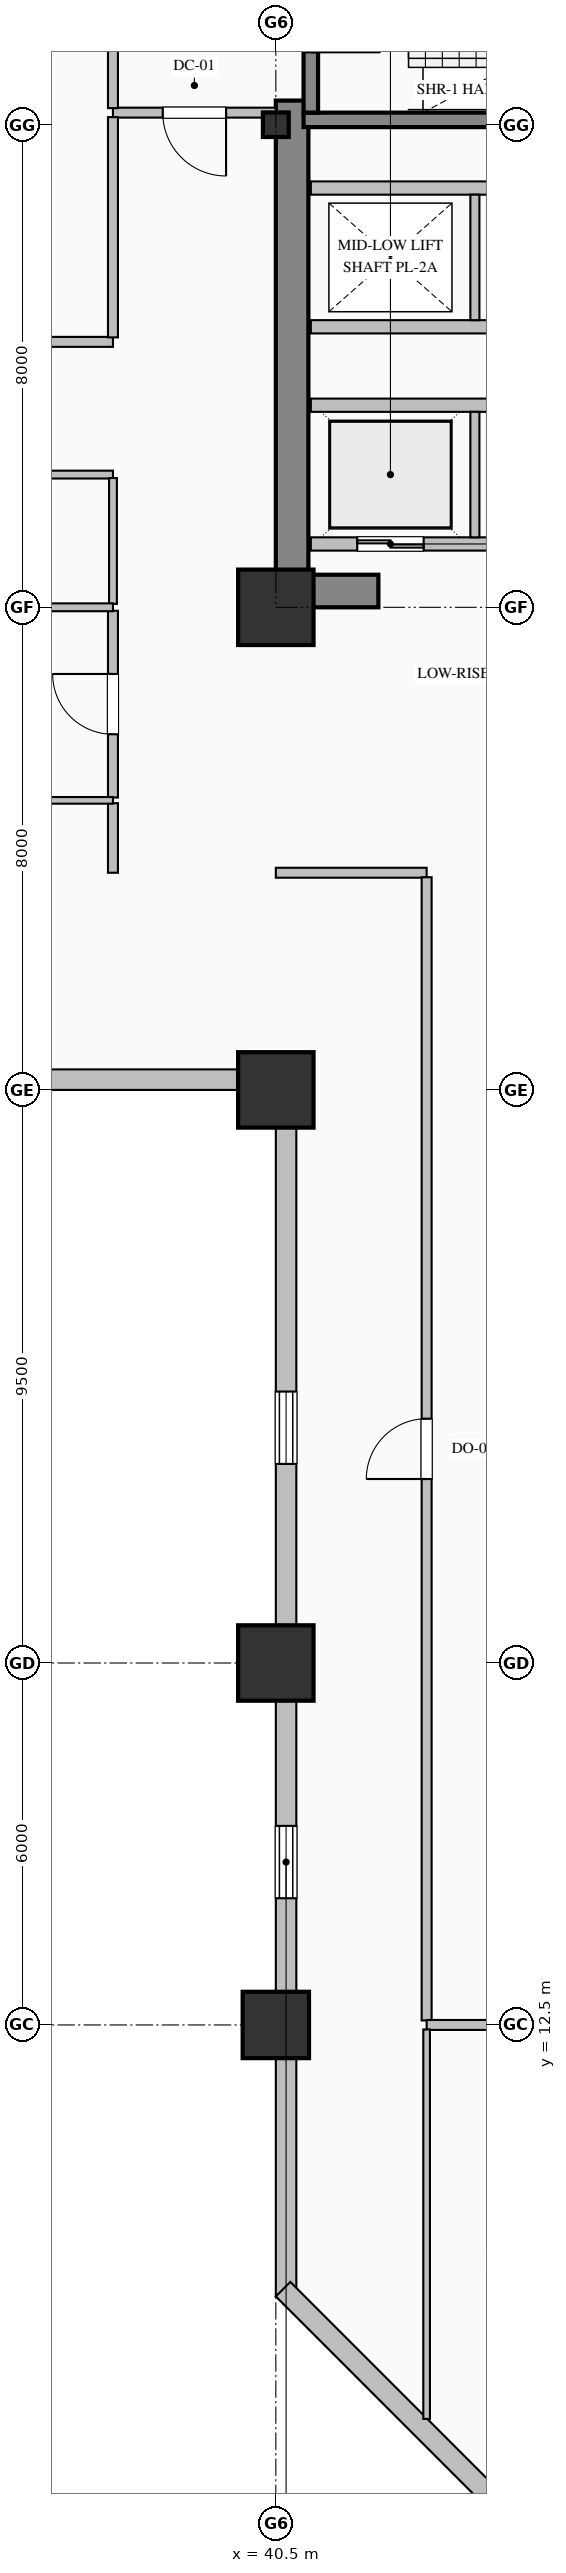
"""IFC4 building model, lengths in metres.
Left out: names, types, materials, properties, quantities, classifications, styles, units other than length and angle.
Written with IfcOpenShell. Run it as: python <this file> out.ifc"""

import sys

from ifc_helpers import new_model, si_unit, direction, frame, frame_2d, origin, origin_2d, place, context, subcontext, project, spatial, rectangle, hollow_rectangle, i_section, extrude, element, fill, save


model = new_model("IFC4")
c1 = context("Model", 3, precision=1e-05, world=origin(), true_north=direction((0.0, 1.0)))
c2 = subcontext(c1, "Body", "Model", "MODEL_VIEW")
j1 = project(units=[si_unit("LENGTHUNIT", "METRE"), si_unit("PLANEANGLEUNIT", "RADIAN")], contexts=[c1])
p1 = place(None, origin())
s1 = spatial("IfcSite", under=j1, at=p1, CompositionType="ELEMENT")
p2 = place(p1, origin())
s2 = spatial("IfcBuilding", under=s1, at=p2, CompositionType="ELEMENT")
p3 = place(p2, frame((0.0, 0.0, 48.2)))
s3 = spatial("IfcBuildingStorey", under=s2, at=p3, CompositionType="ELEMENT", Elevation=48.2)
p4 = place(p3, frame((40.77, 36.54, 0.0), z_axis=(0.0, 0.0, 1.0), x_axis=(0.0, 1.0, 0.0)))
e1 = element("IfcWall", 1, at=p4, inside=s3, PredefinedType="SHEAR", context=c2, shape_type="SweptSolid", body=[
    extrude(rectangle(XDim=7.86, YDim=0.54, at=frame_2d((3.93, 0.0))), origin(), (0.0, 0.0, 1.0), 3.75),
])
p5 = place(p3, frame((40.5, 36.27, 0.0), z_axis=(0.0, 0.0, 1.0), x_axis=(1.0, 0.0, 0.0)))
e2 = element("IfcWall", 2, at=p5, inside=s3, PredefinedType="SHEAR", context=c2, shape_type="SweptSolid", body=[
    extrude(rectangle(XDim=1.7, YDim=0.54, at=frame_2d((0.85, 0.0))), origin(), (0.0, 0.0, 1.0), 3.75),
])
p6 = place(p3, frame((40.5, 12.5, 0.0), z_axis=(0.0, 0.0, 1.0), x_axis=(1.0, 0.0, 0.0)))
e3 = element("IfcColumn", 3, at=p6, inside=s3, PredefinedType="COLUMN", context=c2, shape_type="SweptSolid", body=[
    extrude(hollow_rectangle(XDim=1.1, YDim=1.1, WallThickness=0.04, at=origin_2d()), origin(), (0.0, 0.0, 1.0), 4.0),
])
for number, where, z_axis, x_axis in (
    (4, (40.5, 18.5, 0.0), (0.0, 0.0, 1.0), (1.0, 0.0, 0.0)),
    (5, (40.5, 28.0, 0.0), (0.0, 0.0, 1.0), (1.0, 0.0, 0.0)),
    (6, (40.5, 36.0, 0.0), (0.0, 0.0, 1.0), (1.0, 0.0, 0.0)),
):
    element("IfcColumn", number, at=place(p3, frame(where, z_axis=z_axis, x_axis=x_axis)), inside=s3, PredefinedType="COLUMN", context=c2, shape_type="SweptSolid", body=[
        extrude(hollow_rectangle(XDim=1.25, YDim=1.25, WallThickness=0.045, at=origin_2d()), origin(), (0.0, 0.0, 1.0), 4.0),
    ])
p7 = place(p3, frame((40.5, 44.0, 0.0), z_axis=(0.0, 0.0, 1.0), x_axis=(1.0, 0.0, 0.0)))
e7 = element("IfcColumn", 7, at=p7, inside=s3, PredefinedType="COLUMN", context=c2, shape_type="SweptSolid", body=[
    extrude(i_section(OverallWidth=0.407, OverallDepth=0.428, WebThickness=0.02, FlangeThickness=0.035, FilletRadius=0.022, at=origin_2d()), origin(), (0.0, 0.0, 1.0), 4.0),
])
p8 = place(p3, frame((40.67, 8.0, 0.0), z_axis=(0.0, 0.0, 1.0), x_axis=(0.0, 1.0, 0.0)))
e8 = element("IfcWall", 8, at=p8, inside=s3, PredefinedType="SOLIDWALL", context=c2, shape_type="SweptSolid", body=[
    extrude(rectangle(XDim=20.34, YDim=0.34, at=frame_2d((10.17, 0.0))), origin(), (0.0, 0.0, 1.0), 3.05),
])
p9 = place(p8, frame((6.6, 0.0, 0.7)))
e9 = element("IfcOpeningElement", 9, at=p9, cuts=e8, PredefinedType="OPENING", context=c2, shape_type="SweptSolid", body=[
    extrude(rectangle(XDim=1.2, YDim=1.85, at=frame_2d((0.6, 0.925))), frame((0.0, 0.18, 0.0), z_axis=(0.0, -1.0, 0.0), x_axis=(1.0, 0.0, 0.0)), (0.0, 0.0, 1.0), 0.36),
])
p10 = place(p8, frame((13.8, 0.0, 0.7)))
e10 = element("IfcOpeningElement", 10, at=p10, cuts=e8, PredefinedType="OPENING", context=c2, shape_type="SweptSolid", body=[
    extrude(rectangle(XDim=1.2, YDim=1.85, at=frame_2d((0.6, 0.925))), frame((0.0, 0.18, 0.0), z_axis=(0.0, -1.0, 0.0), x_axis=(1.0, 0.0, 0.0)), (0.0, 0.0, 1.0), 0.36),
])
p11 = place(p3, frame((40.52, 28.17, 0.0), z_axis=(0.0, 0.0, 1.0), x_axis=(-1.0, 0.0, 0.0)))
e11 = element("IfcWall", 11, at=p11, inside=s3, PredefinedType="SOLIDWALL", context=c2, shape_type="SweptSolid", body=[
    extrude(rectangle(XDim=36.52, YDim=0.34, at=frame_2d((18.26, 0.0))), origin(), (0.0, 0.0, 1.0), 3.05),
])
p12 = place(p11, frame((10.2, 0.0, 0.7)))
e12 = element("IfcOpeningElement", 12, at=p12, cuts=e11, PredefinedType="OPENING", context=c2, shape_type="SweptSolid", body=[
    extrude(rectangle(XDim=1.2, YDim=1.85, at=frame_2d((0.6, 0.925))), frame((0.0, 0.18, 0.0), z_axis=(0.0, -1.0, 0.0), x_axis=(1.0, 0.0, 0.0)), (0.0, 0.0, 1.0), 0.36),
])
p13 = place(p11, frame((13.8, 0.0, 0.7)))
e13 = element("IfcOpeningElement", 13, at=p13, cuts=e11, PredefinedType="OPENING", context=c2, shape_type="SweptSolid", body=[
    extrude(rectangle(XDim=1.2, YDim=1.85, at=frame_2d((0.6, 0.925))), frame((0.0, 0.18, 0.0), z_axis=(0.0, -1.0, 0.0), x_axis=(1.0, 0.0, 0.0)), (0.0, 0.0, 1.0), 0.36),
])
p14 = place(p11, frame((17.4, 0.0, 0.7)))
e14 = element("IfcOpeningElement", 14, at=p14, cuts=e11, PredefinedType="OPENING", context=c2, shape_type="SweptSolid", body=[
    extrude(rectangle(XDim=1.2, YDim=1.85, at=frame_2d((0.6, 0.925))), frame((0.0, 0.18, 0.0), z_axis=(0.0, -1.0, 0.0), x_axis=(1.0, 0.0, 0.0)), (0.0, 0.0, 1.0), 0.36),
])
p15 = place(p11, frame((21.0, 0.0, 0.7)))
e15 = element("IfcOpeningElement", 15, at=p15, cuts=e11, PredefinedType="OPENING", context=c2, shape_type="SweptSolid", body=[
    extrude(rectangle(XDim=1.2, YDim=1.85, at=frame_2d((0.6, 0.925))), frame((0.0, 0.18, 0.0), z_axis=(0.0, -1.0, 0.0), x_axis=(1.0, 0.0, 0.0)), (0.0, 0.0, 1.0), 0.36),
])
p16 = place(p11, frame((28.2, 0.0, 0.7)))
e16 = element("IfcOpeningElement", 16, at=p16, cuts=e11, PredefinedType="OPENING", context=c2, shape_type="SweptSolid", body=[
    extrude(rectangle(XDim=1.2, YDim=1.85, at=frame_2d((0.6, 0.925))), frame((0.0, 0.18, 0.0), z_axis=(0.0, -1.0, 0.0), x_axis=(1.0, 0.0, 0.0)), (0.0, 0.0, 1.0), 0.36),
])
p17 = place(p3, frame((44.62, 4.12, 0.0), z_axis=(0.0, 0.0, 1.0), x_axis=(-0.707106781187, 0.707106781187, 0.0)))
e17 = element("IfcWall", 17, at=p17, inside=s3, PredefinedType="SOLIDWALL", context=c2, shape_type="SweptSolid", body=[
    extrude(rectangle(XDim=5.657, YDim=0.34, at=frame_2d((2.828, 0.0))), origin(), (0.0, 0.0, 1.0), 3.75),
])
p18 = place(p3, frame((49.04, 44.08, 0.0), z_axis=(0.0, 0.0, 1.0), x_axis=(-1.0, 0.0, 0.0)))
e18 = element("IfcWall", 18, at=p18, inside=s3, PredefinedType="SOLIDWALL", context=c2, shape_type="SweptSolid", body=[
    extrude(rectangle(XDim=8.08, YDim=0.24, at=frame_2d((4.04, 0.0))), origin(), (0.0, 0.0, 1.0), 4.0),
])
p19 = place(p3, frame((41.08, 47.35, 0.0), z_axis=(0.0, 0.0, 1.0), x_axis=(0.0, -1.0, 0.0)))
e19 = element("IfcWall", 19, at=p19, inside=s3, PredefinedType="SOLIDWALL", context=c2, shape_type="SweptSolid", body=[
    extrude(rectangle(XDim=3.15, YDim=0.24, at=frame_2d((1.575, 0.0))), origin(), (0.0, 0.0, 1.0), 4.0),
])
p20 = place(p19, frame((1.0, 0.0, 0.0)))
e20 = element("IfcOpeningElement", 20, at=p20, cuts=e19, PredefinedType="OPENING", context=c2, shape_type="SweptSolid", body=[
    extrude(rectangle(XDim=1.15, YDim=2.2, at=frame_2d((0.575, 1.1))), frame((0.0, 0.13, 0.0), z_axis=(0.0, -1.0, 0.0), x_axis=(1.0, 0.0, 0.0)), (0.0, 0.0, 1.0), 0.26),
])
p21 = place(p3, frame((49.32, 37.05, 0.0), z_axis=(0.0, 0.0, 1.0), x_axis=(-1.0, 0.0, 0.0)))
e21 = element("IfcWall", 21, at=p21, inside=s3, PredefinedType="PARTITIONING", context=c2, shape_type="SweptSolid", body=[
    extrude(rectangle(XDim=8.24, YDim=0.22, at=frame_2d((4.12, 0.0))), origin(), (0.0, 0.0, 1.0), 3.75),
])
p22 = place(p21, frame((6.37, 0.0, 0.0)))
e22 = element("IfcOpeningElement", 22, at=p22, cuts=e21, PredefinedType="OPENING", context=c2, shape_type="SweptSolid", body=[
    extrude(rectangle(XDim=1.1, YDim=2.2, at=frame_2d((0.55, 1.1))), frame((0.0, 0.12, 0.0), z_axis=(0.0, -1.0, 0.0), x_axis=(1.0, 0.0, 0.0)), (0.0, 0.0, 1.0), 0.24),
])
p23 = place(p21, frame((3.57, 0.0, 0.0)))
e23 = element("IfcOpeningElement", 23, at=p23, cuts=e21, PredefinedType="OPENING", context=c2, shape_type="SweptSolid", body=[
    extrude(rectangle(XDim=1.1, YDim=2.2, at=frame_2d((0.55, 1.1))), frame((0.0, 0.12, 0.0), z_axis=(0.0, -1.0, 0.0), x_axis=(1.0, 0.0, 0.0)), (0.0, 0.0, 1.0), 0.24),
])
p24 = place(p21, frame((0.77, 0.0, 0.0)))
e24 = element("IfcOpeningElement", 24, at=p24, cuts=e21, PredefinedType="OPENING", context=c2, shape_type="SweptSolid", body=[
    extrude(rectangle(XDim=1.1, YDim=2.2, at=frame_2d((0.55, 1.1))), frame((0.0, 0.12, 0.0), z_axis=(0.0, -1.0, 0.0), x_axis=(1.0, 0.0, 0.0)), (0.0, 0.0, 1.0), 0.24),
])
p25 = place(p3, frame((41.08, 39.35, 0.0), z_axis=(0.0, 0.0, 1.0), x_axis=(1.0, 0.0, 0.0)))
e25 = element("IfcWall", 25, at=p25, inside=s3, PredefinedType="PARTITIONING", context=c2, shape_type="SweptSolid", body=[
    extrude(rectangle(XDim=8.24, YDim=0.22, at=frame_2d((4.12, 0.0))), origin(), (0.0, 0.0, 1.0), 3.75),
])
p26 = place(p3, frame((43.8, 37.16, 0.0), z_axis=(0.0, 0.0, 1.0), x_axis=(0.0, 1.0, 0.0)))
e26 = element("IfcWall", 26, at=p26, inside=s3, PredefinedType="PARTITIONING", context=c2, shape_type="SweptSolid", body=[
    extrude(rectangle(XDim=2.08, YDim=0.15, at=frame_2d((1.04, 0.0))), origin(), (0.0, 0.0, 1.0), 3.75),
])
for number, where, z_axis, x_axis in (
    (27, (49.32, 40.65, 0.0), (0.0, 0.0, 1.0), (-1.0, 0.0, 0.0)),
    (28, (41.08, 42.95, 0.0), (0.0, 0.0, 1.0), (1.0, 0.0, 0.0)),
):
    element("IfcWall", number, at=place(p3, frame(where, z_axis=z_axis, x_axis=x_axis)), inside=s3, PredefinedType="PARTITIONING", context=c2, shape_type="SweptSolid", body=[
        extrude(rectangle(XDim=8.24, YDim=0.22, at=frame_2d((4.12, 0.0))), origin(), (0.0, 0.0, 1.0), 3.75),
    ])
p27 = place(p3, frame((43.8, 40.76, 0.0), z_axis=(0.0, 0.0, 1.0), x_axis=(0.0, 1.0, 0.0)))
e29 = element("IfcWall", 29, at=p27, inside=s3, PredefinedType="PARTITIONING", context=c2, shape_type="SweptSolid", body=[
    extrude(rectangle(XDim=2.08, YDim=0.15, at=frame_2d((1.04, 0.0))), origin(), (0.0, 0.0, 1.0), 3.75),
])
p28 = place(p3, frame((40.5, 44.2, 0.0), z_axis=(0.0, 0.0, 1.0), x_axis=(-1.0, 0.0, 0.0)))
e30 = element("IfcWall", 30, at=p28, inside=s3, PredefinedType="PARTITIONING", context=c2, shape_type="SweptSolid", body=[
    extrude(rectangle(XDim=2.7, YDim=0.165, at=frame_2d((1.35, 0.0))), origin(), (0.0, 0.0, 1.0), 3.75),
])
p29 = place(p28, frame((0.825, 0.0, 0.0)))
e31 = element("IfcOpeningElement", 31, at=p29, cuts=e30, PredefinedType="OPENING", context=c2, shape_type="SweptSolid", body=[
    extrude(rectangle(XDim=1.05, YDim=2.15, at=frame_2d((0.525, 1.075))), frame((0.0, 0.093, 0.0), z_axis=(0.0, -1.0, 0.0), x_axis=(1.0, 0.0, 0.0)), (0.0, 0.0, 1.0), 0.185),
])
p30 = place(p3, frame((37.8, 44.274, 0.0), z_axis=(0.0, 0.0, 1.0), x_axis=(0.0, 1.0, 0.0)))
e32 = element("IfcWall", 32, at=p30, inside=s3, PredefinedType="PARTITIONING", context=c2, shape_type="SweptSolid", body=[
    extrude(rectangle(XDim=3.051, YDim=0.165, at=frame_2d((1.525, 0.0))), origin(), (0.0, 0.0, 1.0), 3.75),
])
p31 = place(p3, frame((32.5, 40.4, 0.0), z_axis=(0.0, 0.0, 1.0), x_axis=(1.0, 0.0, 0.0)))
e33 = element("IfcWall", 33, at=p31, inside=s3, PredefinedType="PARTITIONING", context=c2, shape_type="SweptSolid", body=[
    extrude(rectangle(XDim=5.3, YDim=0.165, at=frame_2d((2.65, 0.0))), origin(), (0.0, 0.0, 1.0), 3.75),
])
p32 = place(p31, frame((2.1, 0.0, 0.0)))
e34 = element("IfcOpeningElement", 34, at=p32, cuts=e33, PredefinedType="OPENING", context=c2, shape_type="SweptSolid", body=[
    extrude(rectangle(XDim=1.1, YDim=2.2, at=frame_2d((0.55, 1.1))), frame((0.0, 0.093, 0.0), z_axis=(0.0, -1.0, 0.0), x_axis=(1.0, 0.0, 0.0)), (0.0, 0.0, 1.0), 0.185),
])
p33 = place(p3, frame((37.8, 38.2, 0.0), z_axis=(0.0, 0.0, 1.0), x_axis=(-1.0, 0.0, 0.0)))
e35 = element("IfcWall", 35, at=p33, inside=s3, PredefinedType="PARTITIONING", context=c2, shape_type="SweptSolid", body=[
    extrude(rectangle(XDim=28.8, YDim=0.13, at=frame_2d((14.4, 0.0))), origin(), (0.0, 0.0, 1.0), 3.75),
])
p34 = place(p33, frame((13.9, 0.0, 0.0)))
e36 = element("IfcOpeningElement", 36, at=p34, cuts=e35, PredefinedType="OPENING", context=c2, shape_type="SweptSolid", body=[
    extrude(rectangle(XDim=1.0, YDim=2.15, at=frame_2d((0.5, 1.075))), frame((0.0, 0.075, 0.0), z_axis=(0.0, -1.0, 0.0), x_axis=(1.0, 0.0, 0.0)), (0.0, 0.0, 1.0), 0.15),
])
p35 = place(p3, frame((37.8, 40.475, 0.0), z_axis=(0.0, 0.0, 1.0), x_axis=(0.0, 1.0, 0.0)))
e37 = element("IfcWall", 37, at=p35, inside=s3, PredefinedType="PARTITIONING", context=c2, shape_type="SweptSolid", body=[
    extrude(rectangle(XDim=3.651, YDim=0.165, at=frame_2d((1.825, 0.0))), origin(), (0.0, 0.0, 1.0), 3.75),
])
p36 = place(p3, frame((37.8, 31.6, 0.0), z_axis=(0.0, 0.0, 1.0), x_axis=(0.0, 1.0, 0.0)))
e38 = element("IfcWall", 38, at=p36, inside=s3, PredefinedType="PARTITIONING", context=c2, shape_type="SweptSolid", body=[
    extrude(rectangle(XDim=1.153, YDim=0.165, at=frame_2d((0.576, 0.0))), origin(), (0.0, 0.0, 1.0), 3.75),
])
p37 = place(p3, frame((37.8, 32.847, 0.0), z_axis=(0.0, 0.0, 1.0), x_axis=(0.0, 1.0, 0.0)))
e39 = element("IfcWall", 39, at=p37, inside=s3, PredefinedType="PARTITIONING", context=c2, shape_type="SweptSolid", body=[
    extrude(rectangle(XDim=3.096, YDim=0.165, at=frame_2d((1.548, 0.0))), origin(), (0.0, 0.0, 1.0), 3.75),
])
p38 = place(p37, frame((1.048, 0.0, 0.0)))
e40 = element("IfcOpeningElement", 40, at=p38, cuts=e39, PredefinedType="OPENING", context=c2, shape_type="SweptSolid", body=[
    extrude(rectangle(XDim=1.0, YDim=2.15, at=frame_2d((0.5, 1.075))), frame((0.0, 0.093, 0.0), z_axis=(0.0, -1.0, 0.0), x_axis=(1.0, 0.0, 0.0)), (0.0, 0.0, 1.0), 0.185),
])
p39 = place(p3, frame((37.8, 36.057, 0.0), z_axis=(0.0, 0.0, 1.0), x_axis=(0.0, 1.0, 0.0)))
e41 = element("IfcWall", 41, at=p39, inside=s3, PredefinedType="PARTITIONING", context=c2, shape_type="SweptSolid", body=[
    extrude(rectangle(XDim=2.086, YDim=0.13, at=frame_2d((1.043, 0.0))), origin(), (0.0, 0.0, 1.0), 3.75),
])
p40 = place(p3, frame((43.0, 31.6, 0.0), z_axis=(0.0, 0.0, 1.0), x_axis=(-1.0, 0.0, 0.0)))
e42 = element("IfcWall", 42, at=p40, inside=s3, PredefinedType="PARTITIONING", context=c2, shape_type="SweptSolid", body=[
    extrude(rectangle(XDim=2.5, YDim=0.165, at=frame_2d((1.25, 0.0))), origin(), (0.0, 0.0, 1.0), 3.75),
])
p41 = place(p3, frame((43.0, 12.574, 0.0), z_axis=(0.0, 0.0, 1.0), x_axis=(0.0, 1.0, 0.0)))
e43 = element("IfcWall", 43, at=p41, inside=s3, PredefinedType="PARTITIONING", context=c2, shape_type="SweptSolid", body=[
    extrude(rectangle(XDim=18.951, YDim=0.165, at=frame_2d((9.476, 0.0))), origin(), (0.0, 0.0, 1.0), 3.75),
])
p42 = place(p41, frame((8.976, 0.0, 0.0)))
e44 = element("IfcOpeningElement", 44, at=p42, cuts=e43, PredefinedType="OPENING", context=c2, shape_type="SweptSolid", body=[
    extrude(rectangle(XDim=1.0, YDim=2.15, at=frame_2d((0.5, 1.075))), frame((0.0, 0.093, 0.0), z_axis=(0.0, -1.0, 0.0), x_axis=(1.0, 0.0, 0.0)), (0.0, 0.0, 1.0), 0.185),
])
p43 = place(p3, frame((45.2, 12.5, 0.0), z_axis=(0.0, 0.0, 1.0), x_axis=(-1.0, 0.0, 0.0)))
e45 = element("IfcWall", 45, at=p43, inside=s3, PredefinedType="PARTITIONING", context=c2, shape_type="SweptSolid", body=[
    extrude(rectangle(XDim=2.2, YDim=0.165, at=frame_2d((1.1, 0.0))), origin(), (0.0, 0.0, 1.0), 3.042),
])
p44 = place(p3, frame((43.0, 12.426, 0.0), z_axis=(0.0, 0.0, 1.0), x_axis=(0.0, -1.0, 0.0)))
e46 = element("IfcWall", 46, at=p44, inside=s3, PredefinedType="MOVABLE", context=c2, shape_type="SweptSolid", body=[
    extrude(rectangle(XDim=6.456, YDim=0.11, at=frame_2d((3.228, 0.0))), origin(), (0.0, 0.0, 1.0), 3.75),
])
p45 = place(p3, frame((0.332, 32.8, 0.0), z_axis=(0.0, 0.0, 1.0), x_axis=(1.0, 0.0, 0.0)))
e47 = element("IfcWall", 47, at=p45, inside=s3, PredefinedType="MOVABLE", context=c2, shape_type="SweptSolid", body=[
    extrude(rectangle(XDim=37.468, YDim=0.11, at=frame_2d((18.734, 0.0))), origin(), (0.0, 0.0, 1.0), 3.75),
])
p46 = place(p45, frame((18.234, 0.0, 0.0)))
e48 = element("IfcOpeningElement", 48, at=p46, cuts=e47, PredefinedType="OPENING", context=c2, shape_type="SweptSolid", body=[
    extrude(rectangle(XDim=1.0, YDim=2.15, at=frame_2d((0.5, 1.075))), frame((0.0, 0.065, 0.0), z_axis=(0.0, -1.0, 0.0), x_axis=(1.0, 0.0, 0.0)), (0.0, 0.0, 1.0), 0.13),
])
p47 = place(p3, frame((0.332, 36.0, 0.0), z_axis=(0.0, 0.0, 1.0), x_axis=(1.0, 0.0, 0.0)))
e49 = element("IfcWall", 49, at=p47, inside=s3, PredefinedType="PARTITIONING", context=c2, shape_type="SweptSolid", body=[
    extrude(rectangle(XDim=37.468, YDim=0.13, at=frame_2d((18.734, 0.0))), origin(), (0.0, 0.0, 1.0), 3.042),
])
p48 = place(p9, origin())
e50 = element("IfcWindow", 50, at=p48, inside=s3, PartitioningType="DOUBLE_PANEL_VERTICAL", PredefinedType="WINDOW", context=c2, shape_type="SweptSolid", body=[
    extrude(rectangle(XDim=1.2, YDim=1.85, at=frame_2d((0.6, 0.925))), frame((0.0, 0.15, 0.0), z_axis=(0.0, -1.0, 0.0), x_axis=(1.0, 0.0, 0.0)), (0.0, 0.0, 1.0), 0.06),
])
fill(e9, e50)
p49 = place(p10, origin())
e51 = element("IfcWindow", 51, at=p49, inside=s3, PartitioningType="DOUBLE_PANEL_VERTICAL", PredefinedType="WINDOW", context=c2, shape_type="SweptSolid", body=[
    extrude(rectangle(XDim=1.2, YDim=1.85, at=frame_2d((0.6, 0.925))), frame((0.0, 0.15, 0.0), z_axis=(0.0, -1.0, 0.0), x_axis=(1.0, 0.0, 0.0)), (0.0, 0.0, 1.0), 0.06),
])
fill(e10, e51)
p50 = place(p22, origin())
e52 = element("IfcDoor", 52, at=p50, inside=s3, OperationType="DOUBLE_DOOR_SLIDING", PredefinedType="DOOR", context=c2, shape_type="SweptSolid", body=[
    extrude(rectangle(XDim=1.1, YDim=2.2, at=frame_2d((0.55, 1.1))), frame((0.0, 0.025, 0.0), z_axis=(0.0, -1.0, 0.0), x_axis=(1.0, 0.0, 0.0)), (0.0, 0.0, 1.0), 0.05),
])
fill(e22, e52)
p51 = place(p29, origin())
e53 = element("IfcDoor", 53, at=p51, inside=s3, OperationType="SINGLE_SWING_LEFT", PredefinedType="DOOR", context=c2, shape_type="SweptSolid", body=[
    extrude(rectangle(XDim=1.05, YDim=2.15, at=frame_2d((0.525, 1.075))), frame((0.0, 0.025, 0.0), z_axis=(0.0, -1.0, 0.0), x_axis=(1.0, 0.0, 0.0)), (0.0, 0.0, 1.0), 0.05),
])
fill(e31, e53)
p52 = place(p42, origin())
e54 = element("IfcDoor", 54, at=p52, inside=s3, OperationType="SINGLE_SWING_LEFT", PredefinedType="DOOR", context=c2, shape_type="SweptSolid", body=[
    extrude(rectangle(XDim=1.0, YDim=2.15, at=frame_2d((0.5, 1.075))), frame((0.0, 0.025, 0.0), z_axis=(0.0, -1.0, 0.0), x_axis=(1.0, 0.0, 0.0)), (0.0, 0.0, 1.0), 0.05),
])
fill(e44, e54)
p53 = place(p38, origin())
e55 = element("IfcDoor", 55, at=p53, inside=s3, OperationType="SINGLE_SWING_RIGHT", PredefinedType="DOOR", context=c2, shape_type="SweptSolid", body=[
    extrude(rectangle(XDim=1.0, YDim=2.15, at=frame_2d((0.5, 1.075))), frame((0.0, 0.025, 0.0), z_axis=(0.0, -1.0, 0.0), x_axis=(1.0, 0.0, 0.0)), (0.0, 0.0, 1.0), 0.05),
])
fill(e40, e55)
save(model, sys.argv[1])
